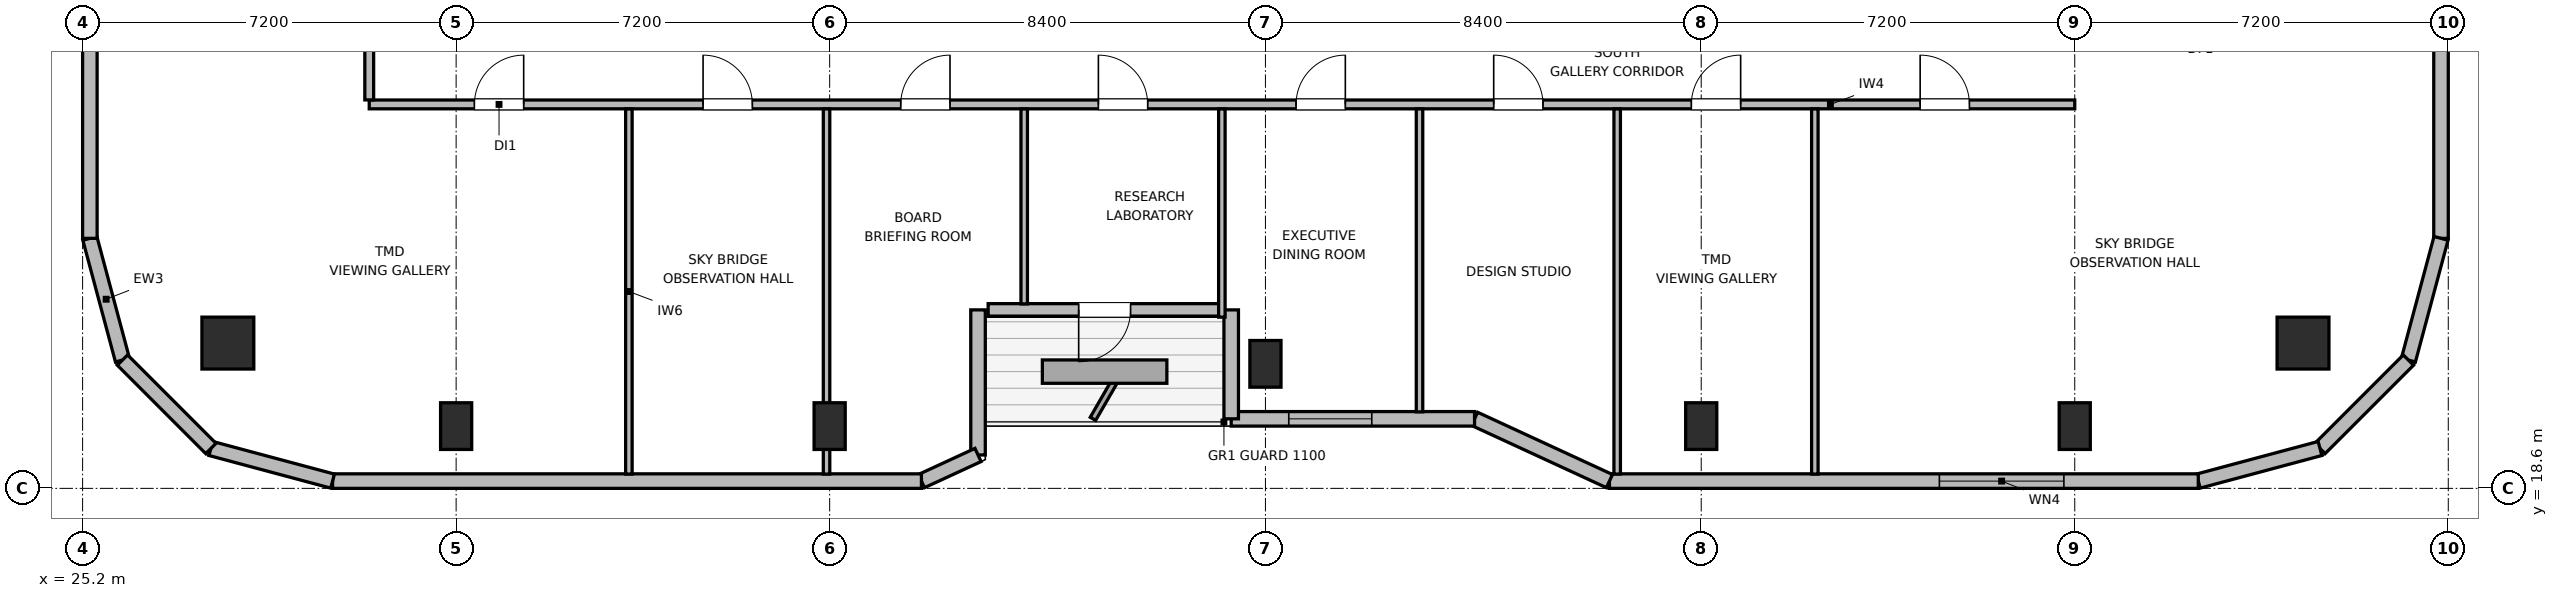
"""IFC4 building model, lengths in metres.
Left out: names, types, materials, properties, quantities, classifications, styles, units other than length and angle.
Written with IfcOpenShell. Run it as: python <this file> out.ifc"""

import sys

from ifc_helpers import new_model, si_unit, direction, frame, frame_2d, origin, origin_2d, place, context, subcontext, project, spatial, rectangle, circle, extrude, element, fill, save


model = new_model("IFC4")
c1 = context("Model", 3, precision=1e-05, world=origin(), true_north=direction((0.0, 1.0)))
c2 = subcontext(c1, "Body", "Model", "MODEL_VIEW")
j1 = project(units=[si_unit("LENGTHUNIT", "METRE"), si_unit("PLANEANGLEUNIT", "RADIAN")], contexts=[c1])
p1 = place(None, origin())
s1 = spatial("IfcSite", under=j1, at=p1, CompositionType="ELEMENT")
p2 = place(p1, origin())
s2 = spatial("IfcBuilding", under=s1, at=p2, CompositionType="ELEMENT")
p3 = place(p2, frame((0.0, 0.0, 350.4)))
s3 = spatial("IfcBuildingStorey", under=s2, at=p3, CompositionType="ELEMENT", Elevation=350.4)
for number, where, z_axis, x_axis in (
    (1, (28.0, 21.4, 0.0), (0.0, 0.0, 1.0), (1.0, 0.0, 0.0)),
    (2, (68.0, 21.4, 0.0), (0.0, 0.0, 1.0), (1.0, 0.0, 0.0)),
):
    element("IfcColumn", number, at=place(p3, frame(where, z_axis=z_axis, x_axis=x_axis)), inside=s3, PredefinedType="COLUMN", context=c2, shape_type="SweptSolid", body=[
        extrude(circle(Radius=0.5, at=origin_2d()), origin(), (0.0, 0.0, 1.0), 4.5),
    ])
for number, where, z_axis, x_axis in (
    (3, (32.4, 19.8, 0.0), (0.0, 0.0, 1.0), (1.0, 0.0, 0.0)),
    (4, (39.6, 19.8, 0.0), (0.0, 0.0, 1.0), (1.0, 0.0, 0.0)),
    (5, (48.0, 21.0, 0.0), (0.0, 0.0, 1.0), (1.0, 0.0, 0.0)),
    (6, (56.4, 19.8, 0.0), (0.0, 0.0, 1.0), (1.0, 0.0, 0.0)),
    (7, (63.6, 19.8, 0.0), (0.0, 0.0, 1.0), (1.0, 0.0, 0.0)),
):
    element("IfcColumn", number, at=place(p3, frame(where, z_axis=z_axis, x_axis=x_axis)), inside=s3, PredefinedType="COLUMN", context=c2, shape_type="SweptSolid", body=[
        extrude(rectangle(XDim=0.6, YDim=0.9, at=origin_2d()), origin(), (0.0, 0.0, 1.0), 4.5),
    ])
p4 = place(p3, frame((25.969, 21.073, 0.0), z_axis=(0.0, 0.0, 1.0), x_axis=(-0.258751159445, 0.965944013639, 0.0)))
e8 = element("IfcWall", 8, at=p4, inside=s3, PredefinedType="SOLIDWALL", context=c2, shape_type="SweptSolid", body=[
    extrude(rectangle(XDim=2.429, YDim=0.28, at=frame_2d((1.214, 0.0))), origin(), (0.0, 0.0, 1.0), 2.695),
])
p5 = place(p3, frame((25.34, 23.418, 0.0), z_axis=(0.0, 0.0, 1.0), x_axis=(0.0, 1.0, 0.0)))
e9 = element("IfcWall", 9, at=p5, inside=s3, PredefinedType="SOLIDWALL", context=c2, shape_type="SweptSolid", body=[
    extrude(rectangle(XDim=5.842, YDim=0.28, at=frame_2d((2.921, 0.0))), origin(), (0.0, 0.0, 1.0), 4.2),
])
p6 = place(p3, frame((70.66, 37.66, 0.0), z_axis=(0.0, 0.0, 1.0), x_axis=(0.0, -1.0, 0.0)))
e10 = element("IfcWall", 10, at=p6, inside=s3, PredefinedType="SOLIDWALL", context=c2, shape_type="SweptSolid", body=[
    extrude(rectangle(XDim=14.241, YDim=0.28, at=frame_2d((7.121, 0.0))), origin(), (0.0, 0.0, 1.0), 4.2),
])
p7 = place(p6, frame((6.321, 0.0, 0.85)))
e11 = element("IfcOpeningElement", 11, at=p7, cuts=e10, PredefinedType="OPENING", context=c2, shape_type="SweptSolid", body=[
    extrude(rectangle(XDim=1.6, YDim=1.0, at=frame_2d((0.8, 0.5))), frame((0.0, 0.15, 0.0), z_axis=(0.0, -1.0, 0.0), x_axis=(1.0, 0.0, 0.0)), (0.0, 0.0, 1.0), 0.3),
])
p8 = place(p3, frame((70.66, 23.418, 0.0), z_axis=(0.0, 0.0, 1.0), x_axis=(-0.258751159445, -0.965944013639, 0.0)))
e12 = element("IfcWall", 12, at=p8, inside=s3, PredefinedType="SOLIDWALL", context=c2, shape_type="SweptSolid", body=[
    extrude(rectangle(XDim=2.429, YDim=0.28, at=frame_2d((1.214, 0.0))), origin(), (0.0, 0.0, 1.0), 2.695),
])
p9 = place(p3, frame((70.031, 21.073, 0.0), z_axis=(0.0, 0.0, 1.0), x_axis=(-0.707106781187, -0.707106781187, 0.0)))
e13 = element("IfcWall", 13, at=p9, inside=s3, PredefinedType="SOLIDWALL", context=c2, shape_type="SweptSolid", body=[
    extrude(rectangle(XDim=2.41, YDim=0.28, at=frame_2d((1.205, 0.0))), origin(), (0.0, 0.0, 1.0), 2.695),
])
p10 = place(p3, frame((68.327, 19.368, 0.0), z_axis=(0.0, 0.0, 1.0), x_axis=(-0.965937282298, -0.25877628691, 0.0)))
e14 = element("IfcWall", 14, at=p10, inside=s3, PredefinedType="SOLIDWALL", context=c2, shape_type="SweptSolid", body=[
    extrude(rectangle(XDim=2.428, YDim=0.28, at=frame_2d((1.214, 0.0))), origin(), (0.0, 0.0, 1.0), 4.2),
])
p11 = place(p3, frame((65.982, 18.74, 0.0), z_axis=(0.0, 0.0, 1.0), x_axis=(-1.0, 0.0, 0.0)))
e15 = element("IfcWall", 15, at=p11, inside=s3, PredefinedType="SOLIDWALL", context=c2, shape_type="SweptSolid", body=[
    extrude(rectangle(XDim=11.351, YDim=0.28, at=frame_2d((5.676, 0.0))), origin(), (0.0, 0.0, 1.0), 4.2),
])
p12 = place(p11, frame((2.591, 0.0, 0.85)))
e16 = element("IfcOpeningElement", 16, at=p12, cuts=e15, PredefinedType="OPENING", context=c2, shape_type="SweptSolid", body=[
    extrude(rectangle(XDim=2.4, YDim=1.15, at=frame_2d((1.2, 0.575))), frame((0.0, 0.15, 0.0), z_axis=(0.0, -1.0, 0.0), x_axis=(1.0, 0.0, 0.0)), (0.0, 0.0, 1.0), 0.3),
])
p13 = place(p3, frame((54.631, 18.74, 0.0), z_axis=(0.0, 0.0, 1.0), x_axis=(-0.907956889006, 0.419063584324, 0.0)))
e17 = element("IfcWall", 17, at=p13, inside=s3, PredefinedType="SOLIDWALL", context=c2, shape_type="SweptSolid", body=[
    extrude(rectangle(XDim=2.864, YDim=0.28, at=frame_2d((1.432, 0.0))), origin(), (0.0, 0.0, 1.0), 2.735),
])
p14 = place(p3, frame((52.031, 19.94, 0.0), z_axis=(0.0, 0.0, 1.0), x_axis=(-1.0, 0.0, 0.0)))
e18 = element("IfcWall", 18, at=p14, inside=s3, PredefinedType="SOLIDWALL", context=c2, shape_type="SweptSolid", body=[
    extrude(rectangle(XDim=4.691, YDim=0.28, at=frame_2d((2.345, 0.0))), origin(), (0.0, 0.0, 1.0), 2.735),
])
p15 = place(p14, frame((1.981, 0.0, 0.85)))
e19 = element("IfcOpeningElement", 19, at=p15, cuts=e18, PredefinedType="OPENING", context=c2, shape_type="SweptSolid", body=[
    extrude(rectangle(XDim=1.6, YDim=1.0, at=frame_2d((0.8, 0.5))), frame((0.0, 0.15, 0.0), z_axis=(0.0, -1.0, 0.0), x_axis=(1.0, 0.0, 0.0)), (0.0, 0.0, 1.0), 0.3),
])
p16 = place(p3, frame((47.34, 19.94, 0.0), z_axis=(0.0, 0.0, 1.0), x_axis=(0.0, 1.0, 0.0)))
e20 = element("IfcWall", 20, at=p16, inside=s3, PredefinedType="SOLIDWALL", context=c2, shape_type="SweptSolid", body=[
    extrude(rectangle(XDim=2.1, YDim=0.28, at=frame_2d((1.05, 0.0))), origin(), (0.0, 0.0, 1.0), 2.735),
])
p17 = place(p3, frame((47.145, 22.04, 0.0), z_axis=(0.0, 0.0, 1.0), x_axis=(-1.0, 0.0, 0.0)))
e21 = element("IfcWall", 21, at=p17, inside=s3, PredefinedType="SOLIDWALL", context=c2, shape_type="SweptSolid", body=[
    extrude(rectangle(XDim=4.49, YDim=0.24, at=frame_2d((2.245, 0.0))), origin(), (0.0, 0.0, 1.0), 2.735),
])
p18 = place(p17, frame((1.745, 0.0, 0.0)))
e22 = element("IfcOpeningElement", 22, at=p18, cuts=e21, PredefinedType="OPENING", context=c2, shape_type="SweptSolid", body=[
    extrude(rectangle(XDim=1.0, YDim=2.02, at=frame_2d((0.5, 1.01))), frame((0.0, 0.13, 0.0), z_axis=(0.0, -1.0, 0.0), x_axis=(1.0, 0.0, 0.0)), (0.0, 0.0, 1.0), 0.26),
])
p19 = place(p3, frame((42.46, 22.04, 0.0), z_axis=(0.0, 0.0, 1.0), x_axis=(0.0, -1.0, 0.0)))
e23 = element("IfcWall", 23, at=p19, inside=s3, PredefinedType="SOLIDWALL", context=c2, shape_type="SweptSolid", body=[
    extrude(rectangle(XDim=2.796, YDim=0.28, at=frame_2d((1.398, 0.0))), origin(), (0.0, 0.0, 1.0), 2.735),
])
p20 = place(p3, frame((42.46, 19.244, 0.0), z_axis=(0.0, 0.0, 1.0), x_axis=(-0.907893953211, -0.419199916176, 0.0)))
e24 = element("IfcWall", 24, at=p20, inside=s3, PredefinedType="SOLIDWALL", context=c2, shape_type="SweptSolid", body=[
    extrude(rectangle(XDim=1.201, YDim=0.28, at=frame_2d((0.601, 0.0))), origin(), (0.0, 0.0, 1.0), 4.2),
])
p21 = place(p3, frame((41.369, 18.74, 0.0), z_axis=(0.0, 0.0, 1.0), x_axis=(-1.0, 0.0, 0.0)))
e25 = element("IfcWall", 25, at=p21, inside=s3, PredefinedType="SOLIDWALL", context=c2, shape_type="SweptSolid", body=[
    extrude(rectangle(XDim=11.351, YDim=0.28, at=frame_2d((5.675, 0.0))), origin(), (0.0, 0.0, 1.0), 4.2),
])
p22 = place(p3, frame((30.018, 18.74, 0.0), z_axis=(0.0, 0.0, 1.0), x_axis=(-0.965937282298, 0.25877628691, 0.0)))
e26 = element("IfcWall", 26, at=p22, inside=s3, PredefinedType="SOLIDWALL", context=c2, shape_type="SweptSolid", body=[
    extrude(rectangle(XDim=2.428, YDim=0.28, at=frame_2d((1.214, 0.0))), origin(), (0.0, 0.0, 1.0), 4.2),
])
p23 = place(p3, frame((27.673, 19.368, 0.0), z_axis=(0.0, 0.0, 1.0), x_axis=(-0.707106781187, 0.707106781187, 0.0)))
e27 = element("IfcWall", 27, at=p23, inside=s3, PredefinedType="SOLIDWALL", context=c2, shape_type="SweptSolid", body=[
    extrude(rectangle(XDim=2.41, YDim=0.28, at=frame_2d((1.205, 0.0))), origin(), (0.0, 0.0, 1.0), 2.695),
])
p24 = place(p3, frame((30.725, 26.0, 0.0), z_axis=(0.0, 0.0, 1.0), x_axis=(1.0, 0.0, 0.0)))
e28 = element("IfcWall", 28, at=p24, inside=s3, PredefinedType="PARTITIONING", context=c2, shape_type="SweptSolid", body=[
    extrude(rectangle(XDim=32.875, YDim=0.17, at=frame_2d((16.438, 0.0))), origin(), (0.0, 0.0, 1.0), 4.2),
])
p25 = place(p24, frame((2.027, 0.0, 0.0)))
e29 = element("IfcOpeningElement", 29, at=p25, cuts=e28, PredefinedType="OPENING", context=c2, shape_type="SweptSolid", body=[
    extrude(rectangle(XDim=0.95, YDim=2.04, at=frame_2d((0.475, 1.02))), frame((0.0, 0.095, 0.0), z_axis=(0.0, -1.0, 0.0), x_axis=(1.0, 0.0, 0.0)), (0.0, 0.0, 1.0), 0.19),
])
p26 = place(p24, frame((6.435, 0.0, 0.0)))
e30 = element("IfcOpeningElement", 30, at=p26, cuts=e28, PredefinedType="OPENING", context=c2, shape_type="SweptSolid", body=[
    extrude(rectangle(XDim=0.95, YDim=2.04, at=frame_2d((0.475, 1.02))), frame((0.0, 0.095, 0.0), z_axis=(0.0, -1.0, 0.0), x_axis=(1.0, 0.0, 0.0)), (0.0, 0.0, 1.0), 0.19),
])
p27 = place(p24, frame((10.245, 0.0, 0.0)))
e31 = element("IfcOpeningElement", 31, at=p27, cuts=e28, PredefinedType="OPENING", context=c2, shape_type="SweptSolid", body=[
    extrude(rectangle(XDim=0.95, YDim=2.04, at=frame_2d((0.475, 1.02))), frame((0.0, 0.095, 0.0), z_axis=(0.0, -1.0, 0.0), x_axis=(1.0, 0.0, 0.0)), (0.0, 0.0, 1.0), 0.19),
])
p28 = place(p24, frame((14.055, 0.0, 0.0)))
e32 = element("IfcOpeningElement", 32, at=p28, cuts=e28, PredefinedType="OPENING", context=c2, shape_type="SweptSolid", body=[
    extrude(rectangle(XDim=0.95, YDim=2.04, at=frame_2d((0.475, 1.02))), frame((0.0, 0.095, 0.0), z_axis=(0.0, -1.0, 0.0), x_axis=(1.0, 0.0, 0.0)), (0.0, 0.0, 1.0), 0.19),
])
p29 = place(p24, frame((17.865, 0.0, 0.0)))
e33 = element("IfcOpeningElement", 33, at=p29, cuts=e28, PredefinedType="OPENING", context=c2, shape_type="SweptSolid", body=[
    extrude(rectangle(XDim=0.95, YDim=2.04, at=frame_2d((0.475, 1.02))), frame((0.0, 0.095, 0.0), z_axis=(0.0, -1.0, 0.0), x_axis=(1.0, 0.0, 0.0)), (0.0, 0.0, 1.0), 0.19),
])
p30 = place(p24, frame((21.675, 0.0, 0.0)))
e34 = element("IfcOpeningElement", 34, at=p30, cuts=e28, PredefinedType="OPENING", context=c2, shape_type="SweptSolid", body=[
    extrude(rectangle(XDim=0.95, YDim=2.04, at=frame_2d((0.475, 1.02))), frame((0.0, 0.095, 0.0), z_axis=(0.0, -1.0, 0.0), x_axis=(1.0, 0.0, 0.0)), (0.0, 0.0, 1.0), 0.19),
])
p31 = place(p24, frame((25.485, 0.0, 0.0)))
e35 = element("IfcOpeningElement", 35, at=p31, cuts=e28, PredefinedType="OPENING", context=c2, shape_type="SweptSolid", body=[
    extrude(rectangle(XDim=0.95, YDim=2.04, at=frame_2d((0.475, 1.02))), frame((0.0, 0.095, 0.0), z_axis=(0.0, -1.0, 0.0), x_axis=(1.0, 0.0, 0.0)), (0.0, 0.0, 1.0), 0.19),
])
p32 = place(p24, frame((29.895, 0.0, 0.0)))
e36 = element("IfcOpeningElement", 36, at=p32, cuts=e28, PredefinedType="OPENING", context=c2, shape_type="SweptSolid", body=[
    extrude(rectangle(XDim=0.95, YDim=2.04, at=frame_2d((0.475, 1.02))), frame((0.0, 0.095, 0.0), z_axis=(0.0, -1.0, 0.0), x_axis=(1.0, 0.0, 0.0)), (0.0, 0.0, 1.0), 0.19),
])
p33 = place(p3, frame((30.725, 26.087, 0.0), z_axis=(0.0, 0.0, 1.0), x_axis=(0.0, 1.0, 0.0)))
e37 = element("IfcWall", 37, at=p33, inside=s3, PredefinedType="PARTITIONING", context=c2, shape_type="SweptSolid", body=[
    extrude(rectangle(XDim=19.826, YDim=0.17, at=frame_2d((9.913, 0.0))), origin(), (0.0, 0.0, 1.0), 4.2),
])
p34 = place(p33, frame((4.038, 0.0, 0.0)))
e38 = element("IfcOpeningElement", 38, at=p34, cuts=e37, PredefinedType="OPENING", context=c2, shape_type="SweptSolid", body=[
    extrude(rectangle(XDim=0.95, YDim=2.04, at=frame_2d((0.475, 1.02))), frame((0.0, 0.095, 0.0), z_axis=(0.0, -1.0, 0.0), x_axis=(1.0, 0.0, 0.0)), (0.0, 0.0, 1.0), 0.19),
])
p35 = place(p33, frame((14.038, 0.0, 0.0)))
e39 = element("IfcOpeningElement", 39, at=p35, cuts=e37, PredefinedType="OPENING", context=c2, shape_type="SweptSolid", body=[
    extrude(rectangle(XDim=0.95, YDim=2.04, at=frame_2d((0.475, 1.02))), frame((0.0, 0.095, 0.0), z_axis=(0.0, -1.0, 0.0), x_axis=(1.0, 0.0, 0.0)), (0.0, 0.0, 1.0), 0.19),
])
p36 = place(p3, frame((35.73, 18.875, 0.0), z_axis=(0.0, 0.0, 1.0), x_axis=(0.0, 1.0, 0.0)))
e40 = element("IfcWall", 40, at=p36, inside=s3, PredefinedType="PARTITIONING", context=c2, shape_type="SweptSolid", body=[
    extrude(rectangle(XDim=7.038, YDim=0.125, at=frame_2d((3.519, 0.0))), origin(), (0.0, 0.0, 1.0), 4.2),
])
p37 = place(p3, frame((39.54, 18.875, 0.0), z_axis=(0.0, 0.0, 1.0), x_axis=(0.0, 1.0, 0.0)))
e41 = element("IfcWall", 41, at=p37, inside=s3, PredefinedType="PARTITIONING", context=c2, shape_type="SweptSolid", body=[
    extrude(rectangle(XDim=7.038, YDim=0.125, at=frame_2d((3.519, 0.0))), origin(), (0.0, 0.0, 1.0), 2.695),
])
p38 = place(p3, frame((43.35, 22.155, 0.0), z_axis=(0.0, 0.0, 1.0), x_axis=(0.0, 1.0, 0.0)))
e42 = element("IfcWall", 42, at=p38, inside=s3, PredefinedType="PARTITIONING", context=c2, shape_type="SweptSolid", body=[
    extrude(rectangle(XDim=3.758, YDim=0.125, at=frame_2d((1.879, 0.0))), origin(), (0.0, 0.0, 1.0), 3.523),
])
p39 = place(p3, frame((47.16, 21.9, 0.0), z_axis=(0.0, 0.0, 1.0), x_axis=(0.0, 1.0, 0.0)))
e43 = element("IfcWall", 43, at=p39, inside=s3, PredefinedType="PARTITIONING", context=c2, shape_type="SweptSolid", body=[
    extrude(rectangle(XDim=4.013, YDim=0.125, at=frame_2d((2.007, 0.0))), origin(), (0.0, 0.0, 1.0), 4.2),
])
p40 = place(p3, frame((50.97, 20.075, 0.0), z_axis=(0.0, 0.0, 1.0), x_axis=(0.0, 1.0, 0.0)))
e44 = element("IfcWall", 44, at=p40, inside=s3, PredefinedType="PARTITIONING", context=c2, shape_type="SweptSolid", body=[
    extrude(rectangle(XDim=5.838, YDim=0.125, at=frame_2d((2.919, 0.0))), origin(), (0.0, 0.0, 1.0), 4.2),
])
p41 = place(p3, frame((54.78, 18.875, 0.0), z_axis=(0.0, 0.0, 1.0), x_axis=(0.0, 1.0, 0.0)))
e45 = element("IfcWall", 45, at=p41, inside=s3, PredefinedType="PARTITIONING", context=c2, shape_type="SweptSolid", body=[
    extrude(rectangle(XDim=7.038, YDim=0.125, at=frame_2d((3.519, 0.0))), origin(), (0.0, 0.0, 1.0), 3.523),
])
p42 = place(p3, frame((58.59, 18.875, 0.0), z_axis=(0.0, 0.0, 1.0), x_axis=(0.0, 1.0, 0.0)))
e46 = element("IfcWall", 46, at=p42, inside=s3, PredefinedType="PARTITIONING", context=c2, shape_type="SweptSolid", body=[
    extrude(rectangle(XDim=7.038, YDim=0.125, at=frame_2d((3.519, 0.0))), origin(), (0.0, 0.0, 1.0), 4.2),
])
p43 = place(p12, origin())
e47 = element("IfcWindow", 47, at=p43, inside=s3, PartitioningType="SINGLE_PANEL", PredefinedType="WINDOW", context=c2, shape_type="SweptSolid", body=[
    extrude(rectangle(XDim=2.4, YDim=1.15, at=frame_2d((1.2, 0.575))), frame((0.0, 0.03, 0.0), z_axis=(0.0, -1.0, 0.0), x_axis=(1.0, 0.0, 0.0)), (0.0, 0.0, 1.0), 0.06),
])
fill(e16, e47)
p44 = place(p15, origin())
e48 = element("IfcWindow", 48, at=p44, inside=s3, PartitioningType="SINGLE_PANEL", PredefinedType="WINDOW", context=c2, shape_type="SweptSolid", body=[
    extrude(rectangle(XDim=1.6, YDim=1.0, at=frame_2d((0.8, 0.5))), frame((0.0, 0.03, 0.0), z_axis=(0.0, -1.0, 0.0), x_axis=(1.0, 0.0, 0.0)), (0.0, 0.0, 1.0), 0.06),
])
fill(e19, e48)
p45 = place(p18, origin())
e49 = element("IfcDoor", 49, at=p45, inside=s3, OperationType="SINGLE_SWING_RIGHT", PredefinedType="DOOR", context=c2, shape_type="SweptSolid", body=[
    extrude(rectangle(XDim=1.0, YDim=2.02, at=frame_2d((0.5, 1.01))), frame((0.0, 0.025, 0.0), z_axis=(0.0, -1.0, 0.0), x_axis=(1.0, 0.0, 0.0)), (0.0, 0.0, 1.0), 0.05),
])
fill(e22, e49)
p46 = place(p25, origin())
e50 = element("IfcDoor", 50, at=p46, inside=s3, OperationType="SINGLE_SWING_RIGHT", PredefinedType="DOOR", context=c2, shape_type="SweptSolid", body=[
    extrude(rectangle(XDim=0.95, YDim=2.04, at=frame_2d((0.475, 1.02))), frame((0.0, 0.025, 0.0), z_axis=(0.0, -1.0, 0.0), x_axis=(1.0, 0.0, 0.0)), (0.0, 0.0, 1.0), 0.05),
])
fill(e29, e50)
p47 = place(p26, origin())
e51 = element("IfcDoor", 51, at=p47, inside=s3, OperationType="SINGLE_SWING_LEFT", PredefinedType="DOOR", context=c2, shape_type="SweptSolid", body=[
    extrude(rectangle(XDim=0.95, YDim=2.04, at=frame_2d((0.475, 1.02))), frame((0.0, 0.025, 0.0), z_axis=(0.0, -1.0, 0.0), x_axis=(1.0, 0.0, 0.0)), (0.0, 0.0, 1.0), 0.05),
])
fill(e30, e51)
p48 = place(p27, origin())
e52 = element("IfcDoor", 52, at=p48, inside=s3, OperationType="SINGLE_SWING_RIGHT", PredefinedType="DOOR", context=c2, shape_type="SweptSolid", body=[
    extrude(rectangle(XDim=0.95, YDim=2.04, at=frame_2d((0.475, 1.02))), frame((0.0, 0.025, 0.0), z_axis=(0.0, -1.0, 0.0), x_axis=(1.0, 0.0, 0.0)), (0.0, 0.0, 1.0), 0.05),
])
fill(e31, e52)
p49 = place(p28, origin())
e53 = element("IfcDoor", 53, at=p49, inside=s3, OperationType="SINGLE_SWING_LEFT", PredefinedType="DOOR", context=c2, shape_type="SweptSolid", body=[
    extrude(rectangle(XDim=0.95, YDim=2.04, at=frame_2d((0.475, 1.02))), frame((0.0, 0.025, 0.0), z_axis=(0.0, -1.0, 0.0), x_axis=(1.0, 0.0, 0.0)), (0.0, 0.0, 1.0), 0.05),
])
fill(e32, e53)
p50 = place(p29, origin())
e54 = element("IfcDoor", 54, at=p50, inside=s3, OperationType="SINGLE_SWING_RIGHT", PredefinedType="DOOR", context=c2, shape_type="SweptSolid", body=[
    extrude(rectangle(XDim=0.95, YDim=2.04, at=frame_2d((0.475, 1.02))), frame((0.0, 0.025, 0.0), z_axis=(0.0, -1.0, 0.0), x_axis=(1.0, 0.0, 0.0)), (0.0, 0.0, 1.0), 0.05),
])
fill(e33, e54)
p51 = place(p30, origin())
e55 = element("IfcDoor", 55, at=p51, inside=s3, OperationType="SINGLE_SWING_LEFT", PredefinedType="DOOR", context=c2, shape_type="SweptSolid", body=[
    extrude(rectangle(XDim=0.95, YDim=2.04, at=frame_2d((0.475, 1.02))), frame((0.0, 0.025, 0.0), z_axis=(0.0, -1.0, 0.0), x_axis=(1.0, 0.0, 0.0)), (0.0, 0.0, 1.0), 0.05),
])
fill(e34, e55)
p52 = place(p31, origin())
e56 = element("IfcDoor", 56, at=p52, inside=s3, OperationType="SINGLE_SWING_RIGHT", PredefinedType="DOOR", context=c2, shape_type="SweptSolid", body=[
    extrude(rectangle(XDim=0.95, YDim=2.04, at=frame_2d((0.475, 1.02))), frame((0.0, 0.025, 0.0), z_axis=(0.0, -1.0, 0.0), x_axis=(1.0, 0.0, 0.0)), (0.0, 0.0, 1.0), 0.05),
])
fill(e35, e56)
p53 = place(p32, origin())
e57 = element("IfcDoor", 57, at=p53, inside=s3, OperationType="SINGLE_SWING_LEFT", PredefinedType="DOOR", context=c2, shape_type="SweptSolid", body=[
    extrude(rectangle(XDim=0.95, YDim=2.04, at=frame_2d((0.475, 1.02))), frame((0.0, 0.025, 0.0), z_axis=(0.0, -1.0, 0.0), x_axis=(1.0, 0.0, 0.0)), (0.0, 0.0, 1.0), 0.05),
])
fill(e36, e57)
save(model, sys.argv[1])
